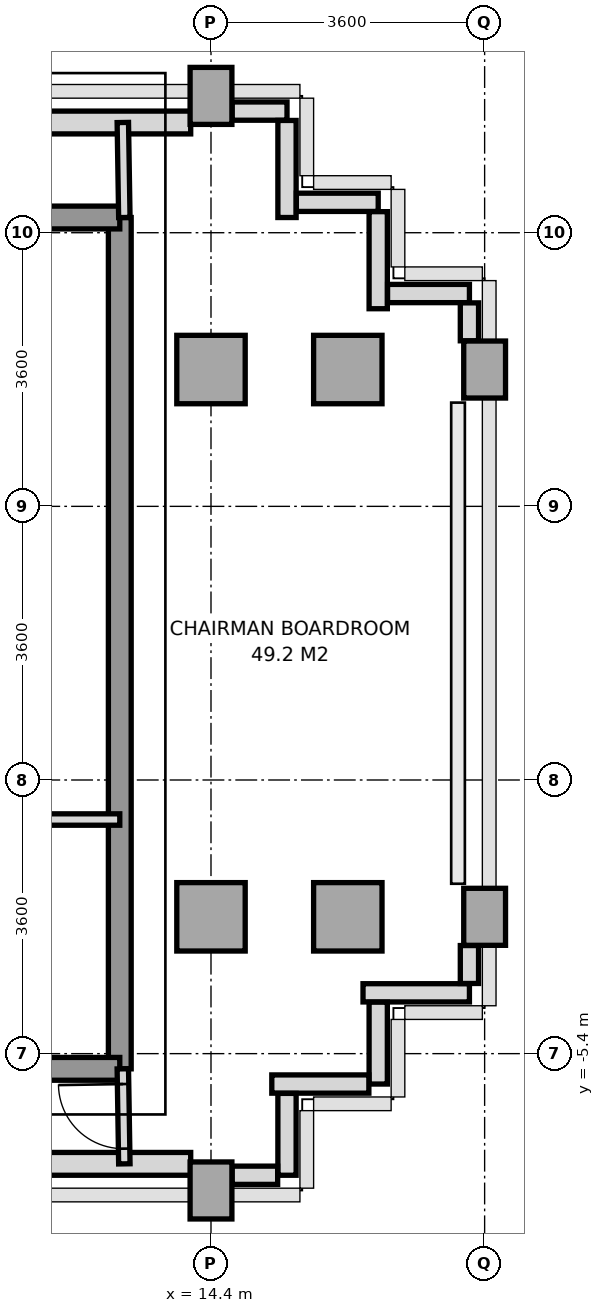
"""IFC4 building model, lengths in metres.
Left out: names, types, materials, properties, quantities, classifications, styles, units other than length and angle.
Written with IfcOpenShell. Run it as: python <this file> out.ifc"""

import sys

from ifc_helpers import new_model, si_unit, direction, frame, frame_2d, origin, origin_2d, place, context, subcontext, project, spatial, rectangle, extrude, source, transform, mapped, element, fill, save


model = new_model("IFC4")
c1 = context("Model", 3, precision=1e-05, world=origin(), true_north=direction((0.0, 1.0)))
c2 = subcontext(c1, "Body", "Model", "MODEL_VIEW")
j1 = project(units=[si_unit("LENGTHUNIT", "METRE"), si_unit("PLANEANGLEUNIT", "RADIAN")], contexts=[c1])
p1 = place(None, origin())
s1 = spatial("IfcSite", under=j1, at=p1, CompositionType="ELEMENT")
p2 = place(p1, origin())
s2 = spatial("IfcBuilding", under=s1, at=p2, CompositionType="ELEMENT")
p3 = place(p2, frame((0.0, 0.0, 223.6)))
s3 = spatial("IfcBuildingStorey", under=s2, at=p3, CompositionType="ELEMENT", Elevation=223.6)
m1 = source(origin(), c2, "Body", "SweptSolid", [
    extrude(rectangle(XDim=0.55, YDim=0.75, at=origin_2d()), origin(), (0.0, 0.0, 1.0), 3.01),
])
p4 = place(p3, frame((14.4, -7.2, 0.0), z_axis=(0.0, 0.0, 1.0), x_axis=(1.0, 0.0, 0.0)))
e1 = element("IfcColumn", 1, at=p4, inside=s3, PredefinedType="COLUMN", context=c2, shape_type="MappedRepresentation", body=[
    mapped(m1, transform((0.0, 0.0, 0.0), x_axis=(1.0, 0.0, 0.0), y_axis=(0.0, 1.0, 0.0), z_axis=(0.0, 0.0, 1.0), scale=1.0)),
])
m2 = source(origin(), c2, "Body", "SweptSolid", [
    extrude(rectangle(XDim=0.9, YDim=0.9, at=origin_2d()), origin(), (0.0, 0.0, 1.0), 3.01),
])
for number, where, z_axis, x_axis in (
    (2, (14.4, -3.6, 0.0), (0.0, 0.0, 1.0), (1.0, 0.0, 0.0)),
    (3, (14.4, 3.6, 0.0), (0.0, 0.0, 1.0), (1.0, 0.0, 0.0)),
):
    element("IfcColumn", number, at=place(p3, frame(where, z_axis=z_axis, x_axis=x_axis)), inside=s3, PredefinedType="COLUMN", context=c2, shape_type="MappedRepresentation", body=[
        mapped(m2, transform((0.0, 0.0, 0.0), x_axis=(1.0, 0.0, 0.0), y_axis=(0.0, 1.0, 0.0), z_axis=(0.0, 0.0, 1.0), scale=1.0)),
    ])
p5 = place(p3, frame((14.4, 7.2, 0.0), z_axis=(0.0, 0.0, 1.0), x_axis=(1.0, 0.0, 0.0)))
e4 = element("IfcColumn", 4, at=p5, inside=s3, PredefinedType="COLUMN", context=c2, shape_type="MappedRepresentation", body=[
    mapped(m1, transform((0.0, 0.0, 0.0), x_axis=(1.0, 0.0, 0.0), y_axis=(0.0, 1.0, 0.0), z_axis=(0.0, 0.0, 1.0), scale=1.0)),
])
for number, where, z_axis, x_axis in (
    (5, (16.2, -3.6, 0.0), (0.0, 0.0, 1.0), (1.0, 0.0, 0.0)),
    (6, (16.2, 3.6, 0.0), (0.0, 0.0, 1.0), (1.0, 0.0, 0.0)),
):
    element("IfcColumn", number, at=place(p3, frame(where, z_axis=z_axis, x_axis=x_axis)), inside=s3, PredefinedType="COLUMN", context=c2, shape_type="MappedRepresentation", body=[
        mapped(m2, transform((0.0, 0.0, 0.0), x_axis=(1.0, 0.0, 0.0), y_axis=(0.0, 1.0, 0.0), z_axis=(0.0, 0.0, 1.0), scale=1.0)),
    ])
for number, where, z_axis, x_axis in (
    (7, (18.0, -3.6, 0.0), (0.0, 0.0, 1.0), (1.0, 0.0, 0.0)),
    (8, (18.0, 3.6, 0.0), (0.0, 0.0, 1.0), (1.0, 0.0, 0.0)),
):
    element("IfcColumn", number, at=place(p3, frame(where, z_axis=z_axis, x_axis=x_axis)), inside=s3, PredefinedType="COLUMN", context=c2, shape_type="MappedRepresentation", body=[
        mapped(m1, transform((0.0, 0.0, 0.0), x_axis=(1.0, 0.0, 0.0), y_axis=(0.0, 1.0, 0.0), z_axis=(0.0, 0.0, 1.0), scale=1.0)),
    ])
p6 = place(p3, frame((11.448, 6.85, 0.0), z_axis=(0.0, 0.0, 1.0), x_axis=(1.0, 0.0, 0.0)))
e9 = element("IfcWall", 9, at=p6, inside=s3, PredefinedType="SOLIDWALL", context=c2, shape_type="SweptSolid", body=[
    extrude(rectangle(XDim=2.685, YDim=0.3, at=frame_2d((1.343, 0.0))), origin(), (0.0, 0.0, 1.0), 2.57),
])
p7 = place(p3, frame((11.75, -6.85, 0.0), z_axis=(0.0, 0.0, 1.0), x_axis=(1.0, 0.0, 0.0)))
e10 = element("IfcWall", 10, at=p7, inside=s3, PredefinedType="SOLIDWALL", context=c2, shape_type="SweptSolid", body=[
    extrude(rectangle(XDim=2.383, YDim=0.3, at=frame_2d((1.191, 0.0))), origin(), (0.0, 0.0, 1.0), 2.57),
])
p8 = place(p3, frame((17.8, -4.6, 0.0), z_axis=(0.0, 0.0, 1.0), x_axis=(-1.0, 0.0, 0.0)))
e11 = element("IfcWall", 11, at=p8, inside=s3, PredefinedType="PARAPET", context=c2, shape_type="SweptSolid", body=[
    extrude(rectangle(XDim=1.4, YDim=0.24, at=frame_2d((0.7, 0.0))), origin(), (0.0, 0.0, 1.0), 1.15),
])
p9 = place(p3, frame((16.6, -4.723, 0.0), z_axis=(0.0, 0.0, 1.0), x_axis=(0.0, -1.0, 0.0)))
e12 = element("IfcWall", 12, at=p9, inside=s3, PredefinedType="PARAPET", context=c2, shape_type="SweptSolid", body=[
    extrude(rectangle(XDim=1.077, YDim=0.24, at=frame_2d((0.539, 0.0))), origin(), (0.0, 0.0, 1.0), 1.15),
])
p10 = place(p3, frame((16.477, -5.8, 0.0), z_axis=(0.0, 0.0, 1.0), x_axis=(-1.0, 0.0, 0.0)))
e13 = element("IfcWall", 13, at=p10, inside=s3, PredefinedType="PARAPET", context=c2, shape_type="SweptSolid", body=[
    extrude(rectangle(XDim=1.277, YDim=0.24, at=frame_2d((0.639, 0.0))), origin(), (0.0, 0.0, 1.0), 1.15),
])
p11 = place(p3, frame((15.4, -5.923, 0.0), z_axis=(0.0, 0.0, 1.0), x_axis=(0.0, -1.0, 0.0)))
e14 = element("IfcWall", 14, at=p11, inside=s3, PredefinedType="PARAPET", context=c2, shape_type="SweptSolid", body=[
    extrude(rectangle(XDim=1.077, YDim=0.24, at=frame_2d((0.539, 0.0))), origin(), (0.0, 0.0, 1.0), 1.15),
])
p12 = place(p3, frame((15.277, -7.0, 0.0), z_axis=(0.0, 0.0, 1.0), x_axis=(-1.0, 0.0, 0.0)))
e15 = element("IfcWall", 15, at=p12, inside=s3, PredefinedType="PARAPET", context=c2, shape_type="SweptSolid", body=[
    extrude(rectangle(XDim=0.599, YDim=0.24, at=frame_2d((0.3, 0.0))), origin(), (0.0, 0.0, 1.0), 1.15),
])
p13 = place(p3, frame((14.678, 7.0, 0.0), z_axis=(0.0, 0.0, 1.0), x_axis=(1.0, 0.0, 0.0)))
e16 = element("IfcWall", 16, at=p13, inside=s3, PredefinedType="PARAPET", context=c2, shape_type="SweptSolid", body=[
    extrude(rectangle(XDim=0.722, YDim=0.24, at=frame_2d((0.361, 0.0))), origin(), (0.0, 0.0, 1.0), 1.15),
])
p14 = place(p3, frame((15.4, 6.877, 0.0), z_axis=(0.0, 0.0, 1.0), x_axis=(0.0, -1.0, 0.0)))
e17 = element("IfcWall", 17, at=p14, inside=s3, PredefinedType="PARAPET", context=c2, shape_type="SweptSolid", body=[
    extrude(rectangle(XDim=1.277, YDim=0.24, at=frame_2d((0.638, 0.0))), origin(), (0.0, 0.0, 1.0), 1.15),
])
p15 = place(p3, frame((15.523, 5.8, 0.0), z_axis=(0.0, 0.0, 1.0), x_axis=(1.0, 0.0, 0.0)))
e18 = element("IfcWall", 18, at=p15, inside=s3, PredefinedType="PARAPET", context=c2, shape_type="SweptSolid", body=[
    extrude(rectangle(XDim=1.077, YDim=0.24, at=frame_2d((0.539, 0.0))), origin(), (0.0, 0.0, 1.0), 1.15),
])
p16 = place(p3, frame((16.6, 5.677, 0.0), z_axis=(0.0, 0.0, 1.0), x_axis=(0.0, -1.0, 0.0)))
e19 = element("IfcWall", 19, at=p16, inside=s3, PredefinedType="PARAPET", context=c2, shape_type="SweptSolid", body=[
    extrude(rectangle(XDim=1.277, YDim=0.24, at=frame_2d((0.639, 0.0))), origin(), (0.0, 0.0, 1.0), 1.15),
])
p17 = place(p3, frame((16.723, 4.6, 0.0), z_axis=(0.0, 0.0, 1.0), x_axis=(1.0, 0.0, 0.0)))
e20 = element("IfcWall", 20, at=p17, inside=s3, PredefinedType="PARAPET", context=c2, shape_type="SweptSolid", body=[
    extrude(rectangle(XDim=1.077, YDim=0.24, at=frame_2d((0.539, 0.0))), origin(), (0.0, 0.0, 1.0), 1.15),
])
for number, where, z_axis, x_axis in (
    (21, (17.8, 4.477, 0.0), (0.0, 0.0, 1.0), (0.0, -1.0, 0.0)),
    (22, (17.8, -3.978, 0.0), (0.0, 0.0, 1.0), (0.0, -1.0, 0.0)),
):
    element("IfcWall", number, at=place(p3, frame(where, z_axis=z_axis, x_axis=x_axis)), inside=s3, PredefinedType="PARAPET", context=c2, shape_type="SweptSolid", body=[
        extrude(rectangle(XDim=0.499, YDim=0.24, at=frame_2d((0.25, 0.0))), origin(), (0.0, 0.0, 1.0), 1.15),
    ])
p18 = place(p3, frame((13.2, -5.6, 0.0), z_axis=(0.0, 0.0, 1.0), x_axis=(0.0, 1.0, 0.0)))
e23 = element("IfcWall", 23, at=p18, inside=s3, PredefinedType="SHEAR", context=c2, shape_type="SweptSolid", body=[
    extrude(rectangle(XDim=11.2, YDim=0.3, at=frame_2d((5.6, 0.0))), origin(), (0.0, 0.0, 1.0), 3.01),
])
p19 = place(p3, frame((11.356, 5.6, 0.0), z_axis=(0.0, 0.0, 1.0), x_axis=(1.0, 0.0, 0.0)))
e24 = element("IfcWall", 24, at=p19, inside=s3, PredefinedType="SHEAR", context=c2, shape_type="SweptSolid", body=[
    extrude(rectangle(XDim=1.844, YDim=0.3, at=frame_2d((0.922, 0.0))), origin(), (0.0, 0.0, 1.0), 3.01),
])
p20 = place(p3, frame((5.4, -5.6, 0.0), z_axis=(0.0, 0.0, 1.0), x_axis=(1.0, 0.0, 0.0)))
e25 = element("IfcWall", 25, at=p20, inside=s3, PredefinedType="SHEAR", context=c2, shape_type="SweptSolid", body=[
    extrude(rectangle(XDim=7.8, YDim=0.3, at=frame_2d((3.9, 0.0))), origin(), (0.0, 0.0, 1.0), 3.01),
])
p21 = place(p20, frame((5.85, 0.0, 0.0)))
e26 = element("IfcOpeningElement", 26, at=p21, cuts=e25, PredefinedType="OPENING", context=c2, shape_type="SweptSolid", body=[
    extrude(rectangle(XDim=0.8, YDim=2.1, at=frame_2d((0.4, 1.05))), frame((0.0, 0.16, 0.0), z_axis=(0.0, -1.0, 0.0), x_axis=(1.0, 0.0, 0.0)), (0.0, 0.0, 1.0), 0.32),
])
p22 = place(p20, frame((1.2, 0.0, 0.0)))
e27 = element("IfcOpeningElement", 27, at=p22, cuts=e25, PredefinedType="OPENING", context=c2, shape_type="SweptSolid", body=[
    extrude(rectangle(XDim=0.85, YDim=2.1, at=frame_2d((0.425, 1.05))), frame((0.0, 0.16, 0.0), z_axis=(0.0, -1.0, 0.0), x_axis=(1.0, 0.0, 0.0)), (0.0, 0.0, 1.0), 0.32),
])
p23 = place(p20, frame((3.4, 0.0, 0.0)))
e28 = element("IfcOpeningElement", 28, at=p23, cuts=e25, PredefinedType="OPENING", context=c2, shape_type="SweptSolid", body=[
    extrude(rectangle(XDim=0.85, YDim=2.1, at=frame_2d((0.425, 1.05))), frame((0.0, 0.16, 0.0), z_axis=(0.0, -1.0, 0.0), x_axis=(1.0, 0.0, 0.0)), (0.0, 0.0, 1.0), 0.32),
])
p24 = place(p3, frame((11.02, -2.32, 0.0), z_axis=(0.0, 0.0, 1.0), x_axis=(1.0, 0.0, 0.0)))
e29 = element("IfcWall", 29, at=p24, inside=s3, PredefinedType="PARTITIONING", context=c2, shape_type="SweptSolid", body=[
    extrude(rectangle(XDim=2.18, YDim=0.15, at=frame_2d((1.09, 0.0))), origin(), (0.0, 0.0, 1.0), 3.01),
])
p25 = place(p3, frame((13.26, 5.6, 0.0), z_axis=(0.0, 0.0, 1.0), x_axis=(-0.016013571389, 0.999871774545, 0.0)))
e30 = element("IfcWall", 30, at=p25, inside=s3, PredefinedType="PARTITIONING", context=c2, shape_type="SweptSolid", body=[
    extrude(rectangle(XDim=1.25, YDim=0.15, at=frame_2d((0.625, 0.0))), origin(), (0.0, 0.0, 1.0), 3.01),
])
p26 = place(p3, frame((13.26, -6.85, 0.0), z_axis=(0.0, 0.0, 1.0), x_axis=(-0.016013571389, 0.999871774545, 0.0)))
e31 = element("IfcWall", 31, at=p26, inside=s3, PredefinedType="PARTITIONING", context=c2, shape_type="SweptSolid", body=[
    extrude(rectangle(XDim=1.25, YDim=0.15, at=frame_2d((0.625, 0.0))), origin(), (0.0, 0.0, 1.0), 3.01),
])
p27 = place(p26, frame((0.2, 0.0, 0.0)))
e32 = element("IfcOpeningElement", 32, at=p27, cuts=e31, PredefinedType="OPENING", context=c2, shape_type="SweptSolid", body=[
    extrude(rectangle(XDim=0.85, YDim=2.1, at=frame_2d((0.425, 1.05))), frame((0.0, 0.085, 0.0), z_axis=(0.0, -1.0, 0.0), x_axis=(1.0, 0.0, 0.0)), (0.0, 0.0, 1.0), 0.17),
])
m3 = source(origin(), c2, "Body", "SweptSolid", [
    extrude(rectangle(XDim=0.85, YDim=2.1, at=frame_2d((0.425, 1.05))), frame((0.0, 0.025, 0.0), z_axis=(0.0, -1.0, 0.0), x_axis=(1.0, 0.0, 0.0)), (0.0, 0.0, 1.0), 0.05),
])
p28 = place(p27, origin())
e33 = element("IfcDoor", 33, at=p28, inside=s3, OperationType="SINGLE_SWING_RIGHT", PredefinedType="DOOR", context=c2, shape_type="MappedRepresentation", body=[
    mapped(m3, transform((0.0, 0.0, 0.0), x_axis=(1.0, 0.0, 0.0), y_axis=(0.0, 1.0, 0.0), z_axis=(0.0, 0.0, 1.0), scale=1.0)),
])
fill(e32, e33)
save(model, sys.argv[1])
